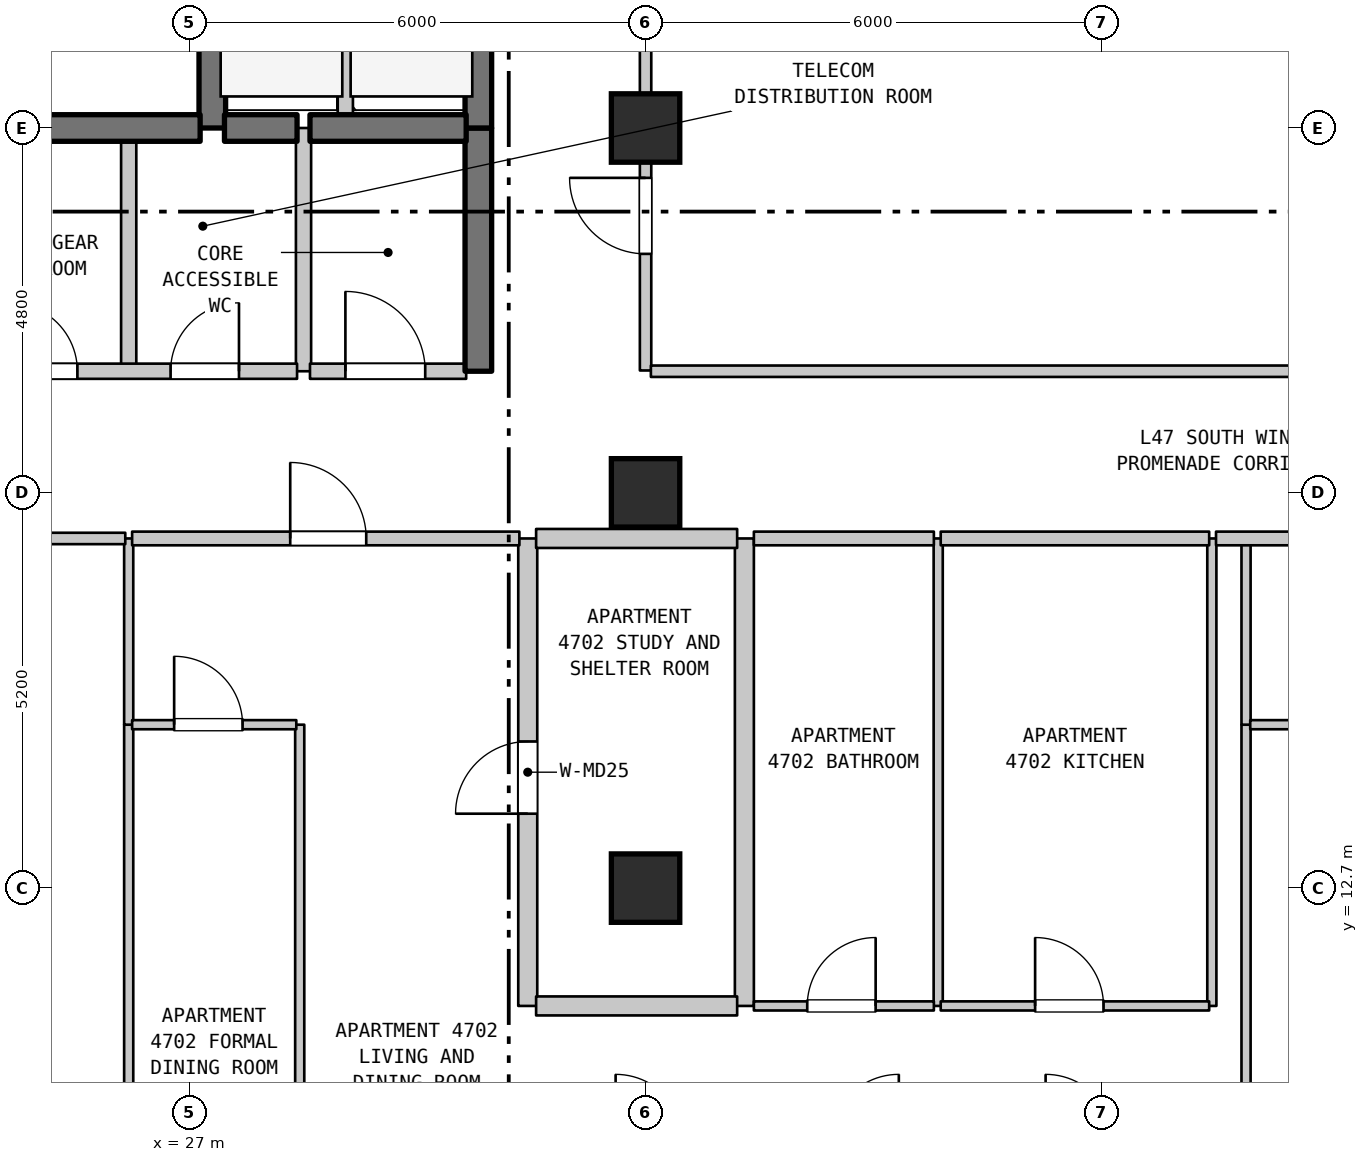
"""IFC4 building model, lengths in metres.
Left out: names, types, materials, properties, quantities, classifications, styles, units other than length and angle.
Written with IfcOpenShell. Run it as: python <this file> out.ifc"""

import sys

from ifc_helpers import new_model, si_unit, direction, frame, frame_2d, origin, origin_2d, place, context, subcontext, project, spatial, rectangle, extrude, element, fill, save


model = new_model("IFC4")
c1 = context("Model", 3, precision=1e-05, world=origin(), true_north=direction((0.0, 1.0)))
c2 = subcontext(c1, "Body", "Model", "MODEL_VIEW")
j1 = project(units=[si_unit("LENGTHUNIT", "METRE"), si_unit("PLANEANGLEUNIT", "RADIAN")], contexts=[c1])
p1 = place(None, origin())
s1 = spatial("IfcSite", under=j1, at=p1, CompositionType="ELEMENT")
p2 = place(p1, origin())
s2 = spatial("IfcBuilding", under=s1, at=p2, CompositionType="ELEMENT")
p3 = place(p2, frame((0.0, 0.0, 192.1)))
s3 = spatial("IfcBuildingStorey", under=s2, at=p3, CompositionType="ELEMENT", Elevation=192.1)
for number, where, z_axis, x_axis in (
    (1, (33.0, 12.7, 0.0), (0.0, 0.0, 1.0), (1.0, 0.0, 0.0)),
    (2, (33.0, 17.9, 0.0), (0.0, 0.0, 1.0), (1.0, 0.0, 0.0)),
    (3, (33.0, 22.7, 0.0), (0.0, 0.0, 1.0), (1.0, 0.0, 0.0)),
):
    element("IfcColumn", number, at=place(p3, frame(where, z_axis=z_axis, x_axis=x_axis)), inside=s3, PredefinedType="COLUMN", context=c2, shape_type="SweptSolid", body=[
        extrude(rectangle(XDim=0.9, YDim=0.9, at=origin_2d()), origin(), (0.0, 0.0, 1.0), 3.7),
    ])
p4 = place(p3, frame((26.2, 0.71, 0.0), z_axis=(0.0, 0.0, 1.0), x_axis=(0.0, 1.0, 0.0)))
e4 = element("IfcWall", 4, at=p4, inside=s3, PredefinedType="PARTITIONING", context=c2, shape_type="SweptSolid", body=[
    extrude(rectangle(XDim=14.14, YDim=0.12, at=frame_2d((7.07, 0.0))), origin(), (0.0, 0.0, 1.0), 3.39),
])
p5 = place(p3, frame((26.2, 14.85, 0.0), z_axis=(0.0, 0.0, 1.0), x_axis=(0.0, 1.0, 0.0)))
e5 = element("IfcWall", 5, at=p5, inside=s3, PredefinedType="PARTITIONING", context=c2, shape_type="SweptSolid", body=[
    extrude(rectangle(XDim=2.45, YDim=0.12, at=frame_2d((1.225, 0.0))), origin(), (0.0, 0.0, 1.0), 3.39),
])
p6 = place(p3, frame((26.2, 19.5, 0.0), z_axis=(0.0, 0.0, 1.0), x_axis=(0.0, 1.0, 0.0)))
e6 = element("IfcWall", 6, at=p6, inside=s3, PredefinedType="STANDARD", context=c2, shape_type="SweptSolid", body=[
    extrude(rectangle(XDim=3.2, YDim=0.2, at=frame_2d((1.6, 0.0))), origin(), (0.0, 0.0, 1.0), 3.39),
])
p7 = place(p3, frame((27.3, 22.7, 0.0), z_axis=(0.0, 0.0, 1.0), x_axis=(0.0, 1.0, 0.0)))
e7 = element("IfcWall", 7, at=p7, inside=s3, PredefinedType="SHEAR", context=c2, shape_type="SweptSolid", body=[
    extrude(rectangle(XDim=2.9, YDim=0.35, at=frame_2d((1.45, 0.0))), origin(), (0.0, 0.0, 1.0), 3.39),
])
p8 = place(p3, frame((28.45, 0.71, 0.0), z_axis=(0.0, 0.0, 1.0), x_axis=(0.0, 1.0, 0.0)))
e8 = element("IfcWall", 8, at=p8, inside=s3, PredefinedType="PARTITIONING", context=c2, shape_type="SweptSolid", body=[
    extrude(rectangle(XDim=14.14, YDim=0.12, at=frame_2d((7.07, 0.0))), origin(), (0.0, 0.0, 1.0), 3.39),
])
p9 = place(p3, frame((28.5, 19.5, 0.0), z_axis=(0.0, 0.0, 1.0), x_axis=(0.0, 1.0, 0.0)))
e9 = element("IfcWall", 9, at=p9, inside=s3, PredefinedType="STANDARD", context=c2, shape_type="SweptSolid", body=[
    extrude(rectangle(XDim=3.2, YDim=0.2, at=frame_2d((1.6, 0.0))), origin(), (0.0, 0.0, 1.0), 3.39),
])
p10 = place(p3, frame((29.05, 22.7, 0.0), z_axis=(0.0, 0.0, 1.0), x_axis=(0.0, 1.0, 0.0)))
e10 = element("IfcWall", 10, at=p10, inside=s3, PredefinedType="STANDARD", context=c2, shape_type="SweptSolid", body=[
    extrude(rectangle(XDim=2.9, YDim=0.2, at=frame_2d((1.45, 0.0))), origin(), (0.0, 0.0, 1.0), 3.39),
])
p11 = place(p3, frame((30.8, 19.5, 0.0), z_axis=(0.0, 0.0, 1.0), x_axis=(0.0, 1.0, 0.0)))
e11 = element("IfcWall", 11, at=p11, inside=s3, PredefinedType="SHEAR", context=c2, shape_type="SweptSolid", body=[
    extrude(rectangle(XDim=3.2, YDim=0.35, at=frame_2d((1.6, 0.0))), origin(), (0.0, 0.0, 1.0), 3.39),
])
p12 = place(p3, frame((30.8, 22.7, 0.0), z_axis=(0.0, 0.0, 1.0), x_axis=(0.0, 1.0, 0.0)))
e12 = element("IfcWall", 12, at=p12, inside=s3, PredefinedType="SHEAR", context=c2, shape_type="SweptSolid", body=[
    extrude(rectangle(XDim=2.9, YDim=0.35, at=frame_2d((1.45, 0.0))), origin(), (0.0, 0.0, 1.0), 3.39),
])
p13 = place(p3, frame((31.45, 11.15, 0.0), z_axis=(0.0, 0.0, 1.0), x_axis=(0.0, 1.0, 0.0)))
e13 = element("IfcWall", 13, at=p13, inside=s3, PredefinedType="STANDARD", context=c2, shape_type="SweptSolid", body=[
    extrude(rectangle(XDim=6.15, YDim=0.25, at=frame_2d((3.075, 0.0))), origin(), (0.0, 0.0, 1.0), 3.39),
])
p14 = place(p13, frame((2.529, 0.0, 0.0)))
e14 = element("IfcOpeningElement", 14, at=p14, cuts=e13, PredefinedType="OPENING", context=c2, shape_type="SweptSolid", body=[
    extrude(rectangle(XDim=0.95, YDim=2.15, at=frame_2d((0.475, 1.075))), frame((0.0, 0.135, 0.0), z_axis=(0.0, -1.0, 0.0), x_axis=(1.0, 0.0, 0.0)), (0.0, 0.0, 1.0), 0.27),
])
p15 = place(p3, frame((33.0, 19.51, 0.0), z_axis=(0.0, 0.0, 1.0), x_axis=(0.0, 1.0, 0.0)))
e15 = element("IfcWall", 15, at=p15, inside=s3, PredefinedType="STANDARD", context=c2, shape_type="SweptSolid", body=[
    extrude(rectangle(XDim=5.35, YDim=0.15, at=frame_2d((2.675, 0.0))), origin(), (0.0, 0.0, 1.0), 2.99),
])
p16 = place(p15, frame((1.534, 0.0, 0.0)))
e16 = element("IfcOpeningElement", 16, at=p16, cuts=e15, PredefinedType="OPENING", context=c2, shape_type="SweptSolid", body=[
    extrude(rectangle(XDim=1.0, YDim=2.15, at=frame_2d((0.5, 1.075))), frame((0.0, 0.085, 0.0), z_axis=(0.0, -1.0, 0.0), x_axis=(1.0, 0.0, 0.0)), (0.0, 0.0, 1.0), 0.17),
])
p17 = place(p3, frame((34.3, 11.15, 0.0), z_axis=(0.0, 0.0, 1.0), x_axis=(0.0, 1.0, 0.0)))
e17 = element("IfcWall", 17, at=p17, inside=s3, PredefinedType="STANDARD", context=c2, shape_type="SweptSolid", body=[
    extrude(rectangle(XDim=6.15, YDim=0.25, at=frame_2d((3.075, 0.0))), origin(), (0.0, 0.0, 1.0), 3.39),
])
for number, where, z_axis, x_axis in (
    (18, (36.85, 11.15, 0.0), (0.0, 0.0, 1.0), (0.0, 1.0, 0.0)),
    (19, (40.45, 11.15, 0.0), (0.0, 0.0, 1.0), (0.0, 1.0, 0.0)),
):
    element("IfcWall", number, at=place(p3, frame(where, z_axis=z_axis, x_axis=x_axis)), inside=s3, PredefinedType="PARTITIONING", context=c2, shape_type="SweptSolid", body=[
        extrude(rectangle(XDim=6.15, YDim=0.12, at=frame_2d((3.075, 0.0))), origin(), (0.0, 0.0, 1.0), 3.39),
    ])
p18 = place(p3, frame((40.9, 9.35, 0.0), z_axis=(0.0, 0.0, 1.0), x_axis=(0.0, 1.0, 0.0)))
e20 = element("IfcWall", 20, at=p18, inside=s3, PredefinedType="PARTITIONING", context=c2, shape_type="SweptSolid", body=[
    extrude(rectangle(XDim=5.5, YDim=0.12, at=frame_2d((2.75, 0.0))), origin(), (0.0, 0.0, 1.0), 3.39),
])
p19 = place(p3, frame((40.9, 14.85, 0.0), z_axis=(0.0, 0.0, 1.0), x_axis=(0.0, 1.0, 0.0)))
e21 = element("IfcWall", 21, at=p19, inside=s3, PredefinedType="PARTITIONING", context=c2, shape_type="SweptSolid", body=[
    extrude(rectangle(XDim=2.45, YDim=0.12, at=frame_2d((1.225, 0.0))), origin(), (0.0, 0.0, 1.0), 3.39),
])
p20 = place(p3, frame((31.56, 11.15, 0.0), z_axis=(0.0, 0.0, 1.0), x_axis=(1.0, 0.0, 0.0)))
e22 = element("IfcWall", 22, at=p20, inside=s3, PredefinedType="STANDARD", context=c2, shape_type="SweptSolid", body=[
    extrude(rectangle(XDim=2.645, YDim=0.25, at=frame_2d((1.323, 0.0))), origin(), (0.0, 0.0, 1.0), 3.39),
])
p21 = place(p3, frame((34.425, 11.15, 0.0), z_axis=(0.0, 0.0, 1.0), x_axis=(1.0, 0.0, 0.0)))
e23 = element("IfcWall", 23, at=p21, inside=s3, PredefinedType="PARTITIONING", context=c2, shape_type="SweptSolid", body=[
    extrude(rectangle(XDim=2.368, YDim=0.12, at=frame_2d((1.184, 0.0))), origin(), (0.0, 0.0, 1.0), 3.39),
])
p22 = place(p21, frame((0.702, 0.0, 0.0)))
e24 = element("IfcOpeningElement", 24, at=p22, cuts=e23, PredefinedType="OPENING", context=c2, shape_type="SweptSolid", body=[
    extrude(rectangle(XDim=0.9, YDim=2.1, at=frame_2d((0.45, 1.05))), frame((0.0, 0.07, 0.0), z_axis=(0.0, -1.0, 0.0), x_axis=(1.0, 0.0, 0.0)), (0.0, 0.0, 1.0), 0.14),
])
p23 = place(p3, frame((36.883, 11.15, 0.0), z_axis=(0.0, 0.0, 1.0), x_axis=(1.0, 0.0, 0.0)))
e25 = element("IfcWall", 25, at=p23, inside=s3, PredefinedType="PARTITIONING", context=c2, shape_type="SweptSolid", body=[
    extrude(rectangle(XDim=3.532, YDim=0.12, at=frame_2d((1.766, 0.0))), origin(), (0.0, 0.0, 1.0), 3.39),
])
p24 = place(p23, frame((1.242, 0.0, 0.0)))
e26 = element("IfcOpeningElement", 26, at=p24, cuts=e25, PredefinedType="OPENING", context=c2, shape_type="SweptSolid", body=[
    extrude(rectangle(XDim=0.9, YDim=2.15, at=frame_2d((0.45, 1.075))), frame((0.0, 0.07, 0.0), z_axis=(0.0, -1.0, 0.0), x_axis=(1.0, 0.0, 0.0)), (0.0, 0.0, 1.0), 0.14),
])
p25 = place(p3, frame((26.245, 14.85, 0.0), z_axis=(0.0, 0.0, 1.0), x_axis=(1.0, 0.0, 0.0)))
e27 = element("IfcWall", 27, at=p25, inside=s3, PredefinedType="PARTITIONING", context=c2, shape_type="SweptSolid", body=[
    extrude(rectangle(XDim=2.16, YDim=0.12, at=frame_2d((1.08, 0.0))), origin(), (0.0, 0.0, 1.0), 3.39),
])
p26 = place(p25, frame((0.553, 0.0, 0.0)))
e28 = element("IfcOpeningElement", 28, at=p26, cuts=e27, PredefinedType="OPENING", context=c2, shape_type="SweptSolid", body=[
    extrude(rectangle(XDim=0.9, YDim=2.15, at=frame_2d((0.45, 1.075))), frame((0.0, 0.07, 0.0), z_axis=(0.0, -1.0, 0.0), x_axis=(1.0, 0.0, 0.0)), (0.0, 0.0, 1.0), 0.14),
])
p27 = place(p3, frame((40.955, 14.85, 0.0), z_axis=(0.0, 0.0, 1.0), x_axis=(1.0, 0.0, 0.0)))
e29 = element("IfcWall", 29, at=p27, inside=s3, PredefinedType="PARTITIONING", context=c2, shape_type="SweptSolid", body=[
    extrude(rectangle(XDim=2.16, YDim=0.12, at=frame_2d((1.08, 0.0))), origin(), (0.0, 0.0, 1.0), 3.39),
])
p28 = place(p27, frame((0.553, 0.0, 0.0)))
e30 = element("IfcOpeningElement", 30, at=p28, cuts=e29, PredefinedType="OPENING", context=c2, shape_type="SweptSolid", body=[
    extrude(rectangle(XDim=0.9, YDim=2.15, at=frame_2d((0.45, 1.075))), frame((0.0, 0.07, 0.0), z_axis=(0.0, -1.0, 0.0), x_axis=(1.0, 0.0, 0.0)), (0.0, 0.0, 1.0), 0.14),
])
p29 = place(p3, frame((21.245, 17.3, 0.0), z_axis=(0.0, 0.0, 1.0), x_axis=(1.0, 0.0, 0.0)))
e31 = element("IfcWall", 31, at=p29, inside=s3, PredefinedType="STANDARD", context=c2, shape_type="SweptSolid", body=[
    extrude(rectangle(XDim=4.91, YDim=0.15, at=frame_2d((2.455, 0.0))), origin(), (0.0, 0.0, 1.0), 3.39),
])
p30 = place(p29, frame((1.884, 0.0, 0.0)))
e32 = element("IfcOpeningElement", 32, at=p30, cuts=e31, PredefinedType="OPENING", context=c2, shape_type="SweptSolid", body=[
    extrude(rectangle(XDim=1.0, YDim=2.15, at=frame_2d((0.5, 1.075))), frame((0.0, 0.085, 0.0), z_axis=(0.0, -1.0, 0.0), x_axis=(1.0, 0.0, 0.0)), (0.0, 0.0, 1.0), 0.17),
])
p31 = place(p3, frame((26.245, 17.3, 0.0), z_axis=(0.0, 0.0, 1.0), x_axis=(1.0, 0.0, 0.0)))
e33 = element("IfcWall", 33, at=p31, inside=s3, PredefinedType="STANDARD", context=c2, shape_type="SweptSolid", body=[
    extrude(rectangle(XDim=5.095, YDim=0.18, at=frame_2d((2.547, 0.0))), origin(), (0.0, 0.0, 1.0), 3.39),
])
p32 = place(p31, frame((2.08, 0.0, 0.0)))
e34 = element("IfcOpeningElement", 34, at=p32, cuts=e33, PredefinedType="OPENING", context=c2, shape_type="SweptSolid", body=[
    extrude(rectangle(XDim=1.0, YDim=2.15, at=frame_2d((0.5, 1.075))), frame((0.0, 0.1, 0.0), z_axis=(0.0, -1.0, 0.0), x_axis=(1.0, 0.0, 0.0)), (0.0, 0.0, 1.0), 0.2),
])
p33 = place(p3, frame((31.56, 17.3, 0.0), z_axis=(0.0, 0.0, 1.0), x_axis=(1.0, 0.0, 0.0)))
e35 = element("IfcWall", 35, at=p33, inside=s3, PredefinedType="STANDARD", context=c2, shape_type="SweptSolid", body=[
    extrude(rectangle(XDim=2.645, YDim=0.25, at=frame_2d((1.323, 0.0))), origin(), (0.0, 0.0, 1.0), 3.39),
])
p34 = place(p3, frame((34.425, 17.3, 0.0), z_axis=(0.0, 0.0, 1.0), x_axis=(1.0, 0.0, 0.0)))
e36 = element("IfcWall", 36, at=p34, inside=s3, PredefinedType="STANDARD", context=c2, shape_type="SweptSolid", body=[
    extrude(rectangle(XDim=2.368, YDim=0.18, at=frame_2d((1.184, 0.0))), origin(), (0.0, 0.0, 1.0), 3.39),
])
p35 = place(p3, frame((36.883, 17.3, 0.0), z_axis=(0.0, 0.0, 1.0), x_axis=(1.0, 0.0, 0.0)))
e37 = element("IfcWall", 37, at=p35, inside=s3, PredefinedType="STANDARD", context=c2, shape_type="SweptSolid", body=[
    extrude(rectangle(XDim=3.532, YDim=0.18, at=frame_2d((1.766, 0.0))), origin(), (0.0, 0.0, 1.0), 3.39),
])
p36 = place(p3, frame((40.505, 17.3, 0.0), z_axis=(0.0, 0.0, 1.0), x_axis=(1.0, 0.0, 0.0)))
e38 = element("IfcWall", 38, at=p36, inside=s3, PredefinedType="STANDARD", context=c2, shape_type="SweptSolid", body=[
    extrude(rectangle(XDim=5.545, YDim=0.18, at=frame_2d((2.772, 0.0))), origin(), (0.0, 0.0, 1.0), 3.39),
])
p37 = place(p36, frame((2.305, 0.0, 0.0)))
e39 = element("IfcOpeningElement", 39, at=p37, cuts=e38, PredefinedType="OPENING", context=c2, shape_type="SweptSolid", body=[
    extrude(rectangle(XDim=1.0, YDim=2.15, at=frame_2d((0.5, 1.075))), frame((0.0, 0.1, 0.0), z_axis=(0.0, -1.0, 0.0), x_axis=(1.0, 0.0, 0.0)), (0.0, 0.0, 1.0), 0.2),
])
p38 = place(p3, frame((23.96, 19.5, 0.0), z_axis=(0.0, 0.0, 1.0), x_axis=(1.0, 0.0, 0.0)))
e40 = element("IfcWall", 40, at=p38, inside=s3, PredefinedType="STANDARD", context=c2, shape_type="SweptSolid", body=[
    extrude(rectangle(XDim=4.455, YDim=0.2, at=frame_2d((2.228, 0.0))), origin(), (0.0, 0.0, 1.0), 3.39),
])
p39 = place(p38, frame((0.665, 0.0, 0.0)))
e41 = element("IfcOpeningElement", 41, at=p39, cuts=e40, PredefinedType="OPENING", context=c2, shape_type="SweptSolid", body=[
    extrude(rectangle(XDim=0.9, YDim=2.15, at=frame_2d((0.45, 1.075))), frame((0.0, 0.11, 0.0), z_axis=(0.0, -1.0, 0.0), x_axis=(1.0, 0.0, 0.0)), (0.0, 0.0, 1.0), 0.22),
])
p40 = place(p38, frame((2.791, 0.0, 0.0)))
e42 = element("IfcOpeningElement", 42, at=p40, cuts=e40, PredefinedType="OPENING", context=c2, shape_type="SweptSolid", body=[
    extrude(rectangle(XDim=0.9, YDim=2.15, at=frame_2d((0.45, 1.075))), frame((0.0, 0.11, 0.0), z_axis=(0.0, -1.0, 0.0), x_axis=(1.0, 0.0, 0.0)), (0.0, 0.0, 1.0), 0.22),
])
p41 = place(p3, frame((28.585, 19.5, 0.0), z_axis=(0.0, 0.0, 1.0), x_axis=(1.0, 0.0, 0.0)))
e43 = element("IfcWall", 43, at=p41, inside=s3, PredefinedType="STANDARD", context=c2, shape_type="SweptSolid", body=[
    extrude(rectangle(XDim=2.055, YDim=0.2, at=frame_2d((1.027, 0.0))), origin(), (0.0, 0.0, 1.0), 3.39),
])
p42 = place(p41, frame((0.466, 0.0, 0.0)))
e44 = element("IfcOpeningElement", 44, at=p42, cuts=e43, PredefinedType="OPENING", context=c2, shape_type="SweptSolid", body=[
    extrude(rectangle(XDim=1.05, YDim=2.15, at=frame_2d((0.525, 1.075))), frame((0.0, 0.11, 0.0), z_axis=(0.0, -1.0, 0.0), x_axis=(1.0, 0.0, 0.0)), (0.0, 0.0, 1.0), 0.22),
])
p43 = place(p3, frame((33.07, 19.5, 0.0), z_axis=(0.0, 0.0, 1.0), x_axis=(1.0, 0.0, 0.0)))
e45 = element("IfcWall", 45, at=p43, inside=s3, PredefinedType="STANDARD", context=c2, shape_type="SweptSolid", body=[
    extrude(rectangle(XDim=21.51, YDim=0.15, at=frame_2d((10.755, 0.0))), origin(), (0.0, 0.0, 1.0), 3.39),
])
p44 = place(p43, frame((10.185, 0.0, 0.0)))
e46 = element("IfcOpeningElement", 46, at=p44, cuts=e45, PredefinedType="OPENING", context=c2, shape_type="SweptSolid", body=[
    extrude(rectangle(XDim=1.0, YDim=2.15, at=frame_2d((0.5, 1.075))), frame((0.0, 0.085, 0.0), z_axis=(0.0, -1.0, 0.0), x_axis=(1.0, 0.0, 0.0)), (0.0, 0.0, 1.0), 0.17),
])
p45 = place(p3, frame((23.96, 22.7, 0.0), z_axis=(0.0, 0.0, 1.0), x_axis=(1.0, 0.0, 0.0)))
e47 = element("IfcWall", 47, at=p45, inside=s3, PredefinedType="SHEAR", context=c2, shape_type="SweptSolid", body=[
    extrude(rectangle(XDim=3.18, YDim=0.35, at=frame_2d((1.59, 0.0))), origin(), (0.0, 0.0, 1.0), 3.39),
])
p46 = place(p3, frame((27.46, 22.7, 0.0), z_axis=(0.0, 0.0, 1.0), x_axis=(1.0, 0.0, 0.0)))
e48 = element("IfcWall", 48, at=p46, inside=s3, PredefinedType="SHEAR", context=c2, shape_type="SweptSolid", body=[
    extrude(rectangle(XDim=0.955, YDim=0.35, at=frame_2d((0.478, 0.0))), origin(), (0.0, 0.0, 1.0), 3.39),
])
p47 = place(p3, frame((28.585, 22.7, 0.0), z_axis=(0.0, 0.0, 1.0), x_axis=(1.0, 0.0, 0.0)))
e49 = element("IfcWall", 49, at=p47, inside=s3, PredefinedType="SHEAR", context=c2, shape_type="SweptSolid", body=[
    extrude(rectangle(XDim=2.055, YDim=0.35, at=frame_2d((1.027, 0.0))), origin(), (0.0, 0.0, 1.0), 3.39),
])
p48 = place(p14, origin())
e50 = element("IfcDoor", 50, at=p48, inside=s3, OperationType="SINGLE_SWING_LEFT", PredefinedType="DOOR", context=c2, shape_type="SweptSolid", body=[
    extrude(rectangle(XDim=0.95, YDim=2.15, at=frame_2d((0.475, 1.075))), frame((0.0, 0.025, 0.0), z_axis=(0.0, -1.0, 0.0), x_axis=(1.0, 0.0, 0.0)), (0.0, 0.0, 1.0), 0.05),
])
fill(e14, e50)
p49 = place(p16, origin())
e51 = element("IfcDoor", 51, at=p49, inside=s3, OperationType="SINGLE_SWING_RIGHT", PredefinedType="DOOR", context=c2, shape_type="SweptSolid", body=[
    extrude(rectangle(XDim=1.0, YDim=2.15, at=frame_2d((0.5, 1.075))), frame((0.0, 0.025, 0.0), z_axis=(0.0, -1.0, 0.0), x_axis=(1.0, 0.0, 0.0)), (0.0, 0.0, 1.0), 0.05),
])
fill(e16, e51)
p50 = place(p22, origin())
e52 = element("IfcDoor", 52, at=p50, inside=s3, OperationType="SINGLE_SWING_RIGHT", PredefinedType="DOOR", context=c2, shape_type="SweptSolid", body=[
    extrude(rectangle(XDim=0.9, YDim=2.1, at=frame_2d((0.45, 1.05))), frame((0.0, 0.025, 0.0), z_axis=(0.0, -1.0, 0.0), x_axis=(1.0, 0.0, 0.0)), (0.0, 0.0, 1.0), 0.05),
])
fill(e24, e52)
p51 = place(p24, origin())
e53 = element("IfcDoor", 53, at=p51, inside=s3, OperationType="SINGLE_SWING_LEFT", PredefinedType="DOOR", context=c2, shape_type="SweptSolid", body=[
    extrude(rectangle(XDim=0.9, YDim=2.15, at=frame_2d((0.45, 1.075))), frame((0.0, 0.025, 0.0), z_axis=(0.0, -1.0, 0.0), x_axis=(1.0, 0.0, 0.0)), (0.0, 0.0, 1.0), 0.05),
])
fill(e26, e53)
p52 = place(p26, origin())
e54 = element("IfcDoor", 54, at=p52, inside=s3, OperationType="SINGLE_SWING_LEFT", PredefinedType="DOOR", context=c2, shape_type="SweptSolid", body=[
    extrude(rectangle(XDim=0.9, YDim=2.15, at=frame_2d((0.45, 1.075))), frame((0.0, 0.025, 0.0), z_axis=(0.0, -1.0, 0.0), x_axis=(1.0, 0.0, 0.0)), (0.0, 0.0, 1.0), 0.05),
])
fill(e28, e54)
p53 = place(p32, origin())
e55 = element("IfcDoor", 55, at=p53, inside=s3, OperationType="SINGLE_SWING_LEFT", PredefinedType="DOOR", context=c2, shape_type="SweptSolid", body=[
    extrude(rectangle(XDim=1.0, YDim=2.15, at=frame_2d((0.5, 1.075))), frame((0.0, 0.025, 0.0), z_axis=(0.0, -1.0, 0.0), x_axis=(1.0, 0.0, 0.0)), (0.0, 0.0, 1.0), 0.05),
])
fill(e34, e55)
p54 = place(p39, origin())
e56 = element("IfcDoor", 56, at=p54, inside=s3, OperationType="SINGLE_SWING_LEFT", PredefinedType="DOOR", context=c2, shape_type="SweptSolid", body=[
    extrude(rectangle(XDim=0.9, YDim=2.15, at=frame_2d((0.45, 1.075))), frame((0.0, 0.025, 0.0), z_axis=(0.0, -1.0, 0.0), x_axis=(1.0, 0.0, 0.0)), (0.0, 0.0, 1.0), 0.05),
])
fill(e41, e56)
p55 = place(p40, origin())
e57 = element("IfcDoor", 57, at=p55, inside=s3, OperationType="SINGLE_SWING_RIGHT", PredefinedType="DOOR", context=c2, shape_type="SweptSolid", body=[
    extrude(rectangle(XDim=0.9, YDim=2.15, at=frame_2d((0.45, 1.075))), frame((0.0, 0.025, 0.0), z_axis=(0.0, -1.0, 0.0), x_axis=(1.0, 0.0, 0.0)), (0.0, 0.0, 1.0), 0.05),
])
fill(e42, e57)
p56 = place(p42, origin())
e58 = element("IfcDoor", 58, at=p56, inside=s3, OperationType="SINGLE_SWING_LEFT", PredefinedType="DOOR", context=c2, shape_type="SweptSolid", body=[
    extrude(rectangle(XDim=1.05, YDim=2.15, at=frame_2d((0.525, 1.075))), frame((0.0, 0.025, 0.0), z_axis=(0.0, -1.0, 0.0), x_axis=(1.0, 0.0, 0.0)), (0.0, 0.0, 1.0), 0.05),
])
fill(e44, e58)
save(model, sys.argv[1])
